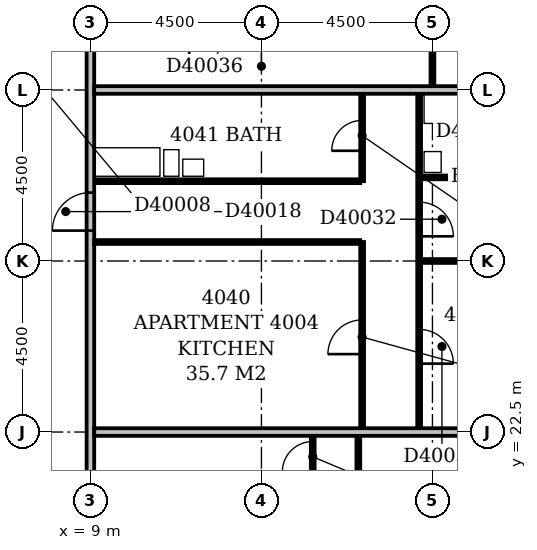
"""IFC4 building model, lengths in metres.
Left out: names, types, materials, properties, quantities, classifications, styles, units other than length and angle.
Written with IfcOpenShell. Run it as: python <this file> out.ifc"""

import sys

from ifc_helpers import new_model, si_unit, direction, frame, frame_2d, origin, place, context, subcontext, project, spatial, rectangle, extrude, element, fill, save


model = new_model("IFC4")
c1 = context("Model", 3, precision=1e-05, world=origin(), true_north=direction((0.0, 1.0)))
c2 = subcontext(c1, "Body", "Model", "MODEL_VIEW")
j1 = project(units=[si_unit("LENGTHUNIT", "METRE"), si_unit("PLANEANGLEUNIT", "RADIAN")], contexts=[c1])
p1 = place(None, origin())
s1 = spatial("IfcSite", under=j1, at=p1, CompositionType="ELEMENT")
p2 = place(p1, origin())
s2 = spatial("IfcBuilding", under=s1, at=p2, CompositionType="ELEMENT")
p3 = place(p2, frame((0.0, 0.0, 159.2)))
s3 = spatial("IfcBuildingStorey", under=s2, at=p3, CompositionType="ELEMENT", Elevation=159.2)
p4 = place(p3, frame((9.0, 5.0, 0.0), z_axis=(0.0, 0.0, 1.0), x_axis=(0.0, 1.0, 0.0)))
e1 = element("IfcWall", 1, at=p4, inside=s3, PredefinedType="PARTITIONING", context=c2, shape_type="SweptSolid", body=[
    extrude(rectangle(XDim=27.75, YDim=0.2, at=frame_2d((13.875, 0.0))), origin(), (0.0, 0.0, 1.0), 3.3),
])
p5 = place(p4, frame((22.8, 0.0, 0.0)))
e2 = element("IfcOpeningElement", 2, at=p5, cuts=e1, PredefinedType="OPENING", context=c2, shape_type="SweptSolid", body=[
    extrude(rectangle(XDim=1.0, YDim=2.1, at=frame_2d((0.5, 1.05))), frame((0.0, 0.112, 0.0), z_axis=(0.0, -1.0, 0.0), x_axis=(1.0, 0.0, 0.0)), (0.0, 0.0, 1.0), 0.224),
])
p6 = place(p4, frame((14.95, 0.0, 0.0)))
e3 = element("IfcOpeningElement", 3, at=p6, cuts=e1, PredefinedType="OPENING", context=c2, shape_type="SweptSolid", body=[
    extrude(rectangle(XDim=1.0, YDim=2.1, at=frame_2d((0.5, 1.05))), frame((0.0, 0.112, 0.0), z_axis=(0.0, -1.0, 0.0), x_axis=(1.0, 0.0, 0.0)), (0.0, 0.0, 1.0), 0.224),
])
p7 = place(p4, frame((9.3, 0.0, 0.0)))
e4 = element("IfcOpeningElement", 4, at=p7, cuts=e1, PredefinedType="OPENING", context=c2, shape_type="SweptSolid", body=[
    extrude(rectangle(XDim=1.0, YDim=2.1, at=frame_2d((0.5, 1.05))), frame((0.0, 0.112, 0.0), z_axis=(0.0, -1.0, 0.0), x_axis=(1.0, 0.0, 0.0)), (0.0, 0.0, 1.0), 0.224),
])
p8 = place(p4, frame((1.5, 0.0, 0.0)))
e5 = element("IfcOpeningElement", 5, at=p8, cuts=e1, PredefinedType="OPENING", context=c2, shape_type="SweptSolid", body=[
    extrude(rectangle(XDim=0.9, YDim=2.1, at=frame_2d((0.45, 1.05))), frame((0.0, 0.112, 0.0), z_axis=(0.0, -1.0, 0.0), x_axis=(1.0, 0.0, 0.0)), (0.0, 0.0, 1.0), 0.224),
])
p9 = place(p3, frame((16.05, 18.1, 0.0), z_axis=(0.0, 0.0, 1.0), x_axis=(0.0, 1.0, 0.0)))
e6 = element("IfcWall", 6, at=p9, inside=s3, PredefinedType="PARTITIONING", context=c2, shape_type="SweptSolid", body=[
    extrude(rectangle(XDim=4.3, YDim=0.1, at=frame_2d((2.15, 0.0))), origin(), (0.0, 0.0, 1.0), 3.3),
])
p10 = place(p9, frame((1.7, 0.0, 0.0)))
e7 = element("IfcOpeningElement", 7, at=p10, cuts=e6, PredefinedType="OPENING", context=c2, shape_type="SweptSolid", body=[
    extrude(rectangle(XDim=0.9, YDim=2.1, at=frame_2d((0.45, 1.05))), frame((0.0, 0.062, 0.0), z_axis=(0.0, -1.0, 0.0), x_axis=(1.0, 0.0, 0.0)), (0.0, 0.0, 1.0), 0.124),
])
p11 = place(p3, frame((14.85, 21.2, 0.0), z_axis=(0.0, 0.0, 1.0), x_axis=(0.0, 1.0, 0.0)))
e8 = element("IfcWall", 8, at=p11, inside=s3, PredefinedType="PARTITIONING", context=c2, shape_type="SweptSolid", body=[
    extrude(rectangle(XDim=1.2, YDim=0.1, at=frame_2d((0.6, 0.0))), origin(), (0.0, 0.0, 1.0), 3.3),
])
p12 = place(p11, frame((0.25, 0.0, 0.0)))
e9 = element("IfcOpeningElement", 9, at=p12, cuts=e8, PredefinedType="OPENING", context=c2, shape_type="SweptSolid", body=[
    extrude(rectangle(XDim=0.8, YDim=2.1, at=frame_2d((0.4, 1.05))), frame((0.0, 0.062, 0.0), z_axis=(0.0, -1.0, 0.0), x_axis=(1.0, 0.0, 0.0)), (0.0, 0.0, 1.0), 0.124),
])
p13 = place(p3, frame((9.1, 22.5, 0.0), z_axis=(0.0, 0.0, 1.0), x_axis=(1.0, 0.0, 0.0)))
e10 = element("IfcWall", 10, at=p13, inside=s3, PredefinedType="PARTITIONING", context=c2, shape_type="SweptSolid", body=[
    extrude(rectangle(XDim=12.9, YDim=0.2, at=frame_2d((6.45, 0.0))), origin(), (0.0, 0.0, 1.0), 3.3),
])
p14 = place(p3, frame((16.15, 22.6, 0.0), z_axis=(0.0, 0.0, 1.0), x_axis=(0.0, 1.0, 0.0)))
e11 = element("IfcWall", 11, at=p14, inside=s3, PredefinedType="PARTITIONING", context=c2, shape_type="SweptSolid", body=[
    extrude(rectangle(XDim=4.9, YDim=0.1, at=frame_2d((2.45, 0.0))), origin(), (0.0, 0.0, 1.0), 3.3),
])
p15 = place(p14, frame((1.95, 0.0, 0.0)))
e12 = element("IfcOpeningElement", 12, at=p15, cuts=e11, PredefinedType="OPENING", context=c2, shape_type="SweptSolid", body=[
    extrude(rectangle(XDim=0.9, YDim=2.1, at=frame_2d((0.45, 1.05))), frame((0.0, 0.062, 0.0), z_axis=(0.0, -1.0, 0.0), x_axis=(1.0, 0.0, 0.0)), (0.0, 0.0, 1.0), 0.124),
])
p16 = place(p3, frame((17.65, 22.6, 0.0), z_axis=(0.0, 0.0, 1.0), x_axis=(0.0, 1.0, 0.0)))
e13 = element("IfcWall", 13, at=p16, inside=s3, PredefinedType="PARTITIONING", context=c2, shape_type="SweptSolid", body=[
    extrude(rectangle(XDim=8.8, YDim=0.1, at=frame_2d((4.4, 0.0))), origin(), (0.0, 0.0, 1.0), 3.3),
])
p17 = place(p16, frame((1.7, 0.0, 0.0)))
e14 = element("IfcOpeningElement", 14, at=p17, cuts=e13, PredefinedType="OPENING", context=c2, shape_type="SweptSolid", body=[
    extrude(rectangle(XDim=0.9, YDim=2.1, at=frame_2d((0.45, 1.05))), frame((0.0, 0.062, 0.0), z_axis=(0.0, -1.0, 0.0), x_axis=(1.0, 0.0, 0.0)), (0.0, 0.0, 1.0), 0.124),
])
p18 = place(p16, frame((5.05, 0.0, 0.0)))
e15 = element("IfcOpeningElement", 15, at=p18, cuts=e13, PredefinedType="OPENING", context=c2, shape_type="SweptSolid", body=[
    extrude(rectangle(XDim=0.9, YDim=2.1, at=frame_2d((0.45, 1.05))), frame((0.0, 0.062, 0.0), z_axis=(0.0, -1.0, 0.0), x_axis=(1.0, 0.0, 0.0)), (0.0, 0.0, 1.0), 0.124),
])
p19 = place(p3, frame((17.7, 27.0, 0.0), z_axis=(0.0, 0.0, 1.0), x_axis=(1.0, 0.0, 0.0)))
e16 = element("IfcWall", 16, at=p19, inside=s3, PredefinedType="PARTITIONING", context=c2, shape_type="SweptSolid", body=[
    extrude(rectangle(XDim=4.3, YDim=0.1, at=frame_2d((2.15, 0.0))), origin(), (0.0, 0.0, 1.0), 2.7),
])
p20 = place(p3, frame((9.1, 27.5, 0.0), z_axis=(0.0, 0.0, 1.0), x_axis=(1.0, 0.0, 0.0)))
e17 = element("IfcWall", 17, at=p20, inside=s3, PredefinedType="PARTITIONING", context=c2, shape_type="SweptSolid", body=[
    extrude(rectangle(XDim=7.0, YDim=0.1, at=frame_2d((3.5, 0.0))), origin(), (0.0, 0.0, 1.0), 2.7),
])
p21 = place(p3, frame((9.1, 29.1, 0.0), z_axis=(0.0, 0.0, 1.0), x_axis=(1.0, 0.0, 0.0)))
e18 = element("IfcWall", 18, at=p21, inside=s3, PredefinedType="PLUMBINGWALL", context=c2, shape_type="SweptSolid", body=[
    extrude(rectangle(XDim=7.0, YDim=0.1, at=frame_2d((3.5, 0.0))), origin(), (0.0, 0.0, 1.0), 3.3),
])
p22 = place(p3, frame((16.15, 29.1, 0.0), z_axis=(0.0, 0.0, 1.0), x_axis=(0.0, 1.0, 0.0)))
e19 = element("IfcWall", 19, at=p22, inside=s3, PredefinedType="PARTITIONING", context=c2, shape_type="SweptSolid", body=[
    extrude(rectangle(XDim=2.3, YDim=0.1, at=frame_2d((1.15, 0.0))), origin(), (0.0, 0.0, 1.0), 3.3),
])
p23 = place(p22, frame((0.8, 0.0, 0.0)))
e20 = element("IfcOpeningElement", 20, at=p23, cuts=e19, PredefinedType="OPENING", context=c2, shape_type="SweptSolid", body=[
    extrude(rectangle(XDim=0.8, YDim=2.1, at=frame_2d((0.4, 1.05))), frame((0.0, 0.062, 0.0), z_axis=(0.0, -1.0, 0.0), x_axis=(1.0, 0.0, 0.0)), (0.0, 0.0, 1.0), 0.124),
])
p24 = place(p3, frame((17.7, 29.2, 0.0), z_axis=(0.0, 0.0, 1.0), x_axis=(1.0, 0.0, 0.0)))
e21 = element("IfcWall", 21, at=p24, inside=s3, PredefinedType="PLUMBINGWALL", context=c2, shape_type="SweptSolid", body=[
    extrude(rectangle(XDim=2.8, YDim=0.1, at=frame_2d((1.4, 0.0))), origin(), (0.0, 0.0, 1.0), 3.3),
])
p25 = place(p24, frame((1.0, 0.0, 0.0)))
e22 = element("IfcOpeningElement", 22, at=p25, cuts=e21, PredefinedType="OPENING", context=c2, shape_type="SweptSolid", body=[
    extrude(rectangle(XDim=0.8, YDim=2.1, at=frame_2d((0.4, 1.05))), frame((0.0, 0.062, 0.0), z_axis=(0.0, -1.0, 0.0), x_axis=(1.0, 0.0, 0.0)), (0.0, 0.0, 1.0), 0.124),
])
p26 = place(p3, frame((9.1, 31.5, 0.0), z_axis=(0.0, 0.0, 1.0), x_axis=(1.0, 0.0, 0.0)))
e23 = element("IfcWall", 23, at=p26, inside=s3, PredefinedType="PARTITIONING", context=c2, shape_type="SweptSolid", body=[
    extrude(rectangle(XDim=12.9, YDim=0.2, at=frame_2d((6.45, 0.0))), origin(), (0.0, 0.0, 1.0), 3.3),
])
p27 = place(p3, frame((18.0, 31.6, 0.0), z_axis=(0.0, 0.0, 1.0), x_axis=(0.0, 1.0, 0.0)))
e24 = element("IfcWall", 24, at=p27, inside=s3, PredefinedType="PARTITIONING", context=c2, shape_type="SweptSolid", body=[
    extrude(rectangle(XDim=4.3, YDim=0.1, at=frame_2d((2.15, 0.0))), origin(), (0.0, 0.0, 1.0), 3.3),
])
p28 = place(p27, frame((1.7, 0.0, 0.0)))
e25 = element("IfcOpeningElement", 25, at=p28, cuts=e24, PredefinedType="OPENING", context=c2, shape_type="SweptSolid", body=[
    extrude(rectangle(XDim=0.9, YDim=2.1, at=frame_2d((0.45, 1.05))), frame((0.0, 0.062, 0.0), z_axis=(0.0, -1.0, 0.0), x_axis=(1.0, 0.0, 0.0)), (0.0, 0.0, 1.0), 0.124),
])
p29 = place(p5, origin())
e26 = element("IfcDoor", 26, at=p29, inside=s3, OperationType="SINGLE_SWING_LEFT", PredefinedType="DOOR", context=c2, shape_type="SweptSolid", body=[
    extrude(rectangle(XDim=1.0, YDim=2.1, at=frame_2d((0.5, 1.05))), frame((0.0, 0.025, 0.0), z_axis=(0.0, -1.0, 0.0), x_axis=(1.0, 0.0, 0.0)), (0.0, 0.0, 1.0), 0.05),
])
fill(e2, e26)
p30 = place(p12, origin())
e27 = element("IfcDoor", 27, at=p30, inside=s3, OperationType="SINGLE_SWING_LEFT", PredefinedType="DOOR", context=c2, shape_type="SweptSolid", body=[
    extrude(rectangle(XDim=0.8, YDim=2.1, at=frame_2d((0.4, 1.05))), frame((0.0, 0.025, 0.0), z_axis=(0.0, -1.0, 0.0), x_axis=(1.0, 0.0, 0.0)), (0.0, 0.0, 1.0), 0.05),
])
fill(e9, e27)
p31 = place(p15, origin())
e28 = element("IfcDoor", 28, at=p31, inside=s3, OperationType="SINGLE_SWING_LEFT", PredefinedType="DOOR", context=c2, shape_type="SweptSolid", body=[
    extrude(rectangle(XDim=0.9, YDim=2.1, at=frame_2d((0.45, 1.05))), frame((0.0, 0.025, 0.0), z_axis=(0.0, -1.0, 0.0), x_axis=(1.0, 0.0, 0.0)), (0.0, 0.0, 1.0), 0.05),
])
fill(e12, e28)
p32 = place(p17, frame((0.9, 0.0, 0.0), z_axis=(0.0, 0.0, 1.0), x_axis=(-1.0, 0.0, 0.0)))
e29 = element("IfcDoor", 29, at=p32, inside=s3, OperationType="SINGLE_SWING_RIGHT", PredefinedType="DOOR", context=c2, shape_type="SweptSolid", body=[
    extrude(rectangle(XDim=0.9, YDim=2.1, at=frame_2d((0.45, 1.05))), frame((0.0, 0.025, 0.0), z_axis=(0.0, -1.0, 0.0), x_axis=(1.0, 0.0, 0.0)), (0.0, 0.0, 1.0), 0.05),
])
fill(e14, e29)
p33 = place(p18, frame((0.9, 0.0, 0.0), z_axis=(0.0, 0.0, 1.0), x_axis=(-1.0, 0.0, 0.0)))
e30 = element("IfcDoor", 30, at=p33, inside=s3, OperationType="SINGLE_SWING_RIGHT", PredefinedType="DOOR", context=c2, shape_type="SweptSolid", body=[
    extrude(rectangle(XDim=0.9, YDim=2.1, at=frame_2d((0.45, 1.05))), frame((0.0, 0.025, 0.0), z_axis=(0.0, -1.0, 0.0), x_axis=(1.0, 0.0, 0.0)), (0.0, 0.0, 1.0), 0.05),
])
fill(e15, e30)
p34 = place(p23, origin())
e31 = element("IfcDoor", 31, at=p34, inside=s3, OperationType="SINGLE_SWING_LEFT", PredefinedType="DOOR", context=c2, shape_type="SweptSolid", body=[
    extrude(rectangle(XDim=0.8, YDim=2.1, at=frame_2d((0.4, 1.05))), frame((0.0, 0.025, 0.0), z_axis=(0.0, -1.0, 0.0), x_axis=(1.0, 0.0, 0.0)), (0.0, 0.0, 1.0), 0.05),
])
fill(e20, e31)
save(model, sys.argv[1])
